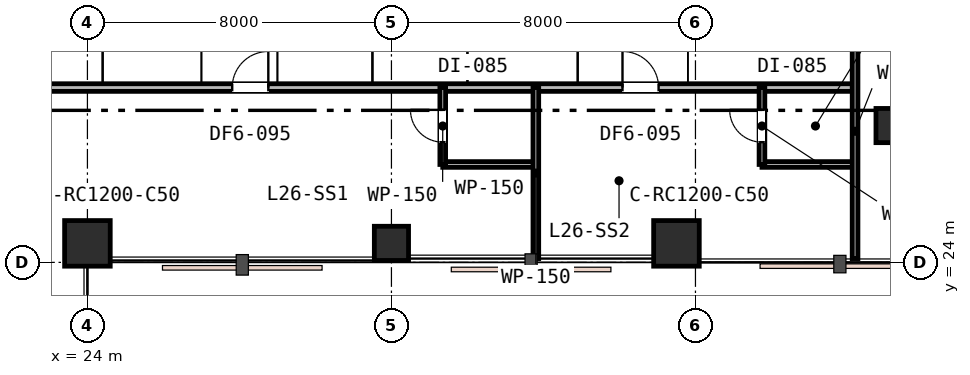
"""IFC4 building model, lengths in metres.
Left out: names, types, materials, properties, quantities, classifications, styles, units other than length and angle.
Written with IfcOpenShell. Run it as: python <this file> out.ifc"""

import sys

from ifc_helpers import new_model, si_unit, direction, frame, frame_2d, origin, origin_2d, place, context, subcontext, project, spatial, rectangle, extrude, element, fill, save


model = new_model("IFC4")
c1 = context("Model", 3, precision=1e-05, world=origin(), true_north=direction((0.0, 1.0)))
c2 = subcontext(c1, "Body", "Model", "MODEL_VIEW")
j1 = project(units=[si_unit("LENGTHUNIT", "METRE"), si_unit("PLANEANGLEUNIT", "RADIAN")], contexts=[c1])
p1 = place(None, origin())
s1 = spatial("IfcSite", under=j1, at=p1, CompositionType="ELEMENT")
p2 = place(p1, origin())
s2 = spatial("IfcBuilding", under=s1, at=p2, CompositionType="ELEMENT")
p3 = place(p2, frame((0.0, 0.0, 104.4)))
s3 = spatial("IfcBuildingStorey", under=s2, at=p3, CompositionType="ELEMENT", Elevation=104.4)
p4 = place(p3, frame((24.0, 24.5, 0.0), z_axis=(0.0, 0.0, 1.0), x_axis=(1.0, 0.0, 0.0)))
e1 = element("IfcColumn", 1, at=p4, inside=s3, PredefinedType="COLUMN", context=c2, shape_type="SweptSolid", body=[
    extrude(rectangle(XDim=1.2, YDim=1.2, at=origin_2d()), origin(), (0.0, 0.0, 1.0), 3.6),
])
p5 = place(p3, frame((32.0, 24.5, 0.0), z_axis=(0.0, 0.0, 1.0), x_axis=(1.0, 0.0, 0.0)))
e2 = element("IfcColumn", 2, at=p5, inside=s3, PredefinedType="COLUMN", context=c2, shape_type="SweptSolid", body=[
    extrude(rectangle(XDim=0.9, YDim=0.9, at=origin_2d()), origin(), (0.0, 0.0, 1.0), 3.6),
])
p6 = place(p3, frame((39.5, 24.5, 0.0), z_axis=(0.0, 0.0, 1.0), x_axis=(1.0, 0.0, 0.0)))
e3 = element("IfcColumn", 3, at=p6, inside=s3, PredefinedType="COLUMN", context=c2, shape_type="SweptSolid", body=[
    extrude(rectangle(XDim=1.2, YDim=1.2, at=origin_2d()), origin(), (0.0, 0.0, 1.0), 3.6),
])
p7 = place(p3, frame((45.2, 27.6, 0.0), z_axis=(0.0, 0.0, 1.0), x_axis=(1.0, 0.0, 0.0)))
e4 = element("IfcColumn", 4, at=p7, inside=s3, PredefinedType="COLUMN", context=c2, shape_type="SweptSolid", body=[
    extrude(rectangle(XDim=0.9, YDim=0.9, at=origin_2d()), origin(), (0.0, 0.0, 1.0), 3.6),
])
p8 = place(p3, frame((15.4, 28.6, 0.0), z_axis=(0.0, 0.0, 1.0), x_axis=(1.0, 0.0, 0.0)))
e5 = element("IfcWall", 5, at=p8, inside=s3, PredefinedType="PARTITIONING", context=c2, shape_type="SweptSolid", body=[
    extrude(rectangle(XDim=28.8, YDim=0.2, at=frame_2d((14.4, 0.0))), origin(), (0.0, 0.0, 1.0), 2.87),
])
p9 = place(p8, frame((12.41, 0.0, 0.0)))
e6 = element("IfcOpeningElement", 6, at=p9, cuts=e5, PredefinedType="OPENING", context=c2, shape_type="SweptSolid", body=[
    extrude(rectangle(XDim=0.95, YDim=2.15, at=frame_2d((0.475, 1.075))), frame((0.0, 0.11, 0.0), z_axis=(0.0, -1.0, 0.0), x_axis=(1.0, 0.0, 0.0)), (0.0, 0.0, 1.0), 0.22),
])
p10 = place(p8, frame((22.68, 0.0, 0.0)))
e7 = element("IfcOpeningElement", 7, at=p10, cuts=e5, PredefinedType="OPENING", context=c2, shape_type="SweptSolid", body=[
    extrude(rectangle(XDim=0.95, YDim=2.15, at=frame_2d((0.475, 1.075))), frame((0.0, 0.11, 0.0), z_axis=(0.0, -1.0, 0.0), x_axis=(1.0, 0.0, 0.0)), (0.0, 0.0, 1.0), 0.22),
])
p11 = place(p3, frame((33.35, 26.576, 0.0), z_axis=(0.0, 0.0, 1.0), x_axis=(1.0, 0.0, 0.0)))
e8 = element("IfcWall", 8, at=p11, inside=s3, PredefinedType="PARTITIONING", context=c2, shape_type="SweptSolid", body=[
    extrude(rectangle(XDim=2.45, YDim=0.15, at=frame_2d((1.225, 0.0))), origin(), (0.0, 0.0, 1.0), 3.01),
])
p12 = place(p3, frame((33.35, 26.576, 0.0), z_axis=(0.0, 0.0, 1.0), x_axis=(0.0, 1.0, 0.0)))
e9 = element("IfcWall", 9, at=p12, inside=s3, PredefinedType="PARTITIONING", context=c2, shape_type="SweptSolid", body=[
    extrude(rectangle(XDim=2.024, YDim=0.15, at=frame_2d((1.012, 0.0))), origin(), (0.0, 0.0, 1.0), 3.33),
])
p13 = place(p12, frame((0.587, 0.0, 0.0)))
e10 = element("IfcOpeningElement", 10, at=p13, cuts=e9, PredefinedType="OPENING", context=c2, shape_type="SweptSolid", body=[
    extrude(rectangle(XDim=0.85, YDim=2.15, at=frame_2d((0.425, 1.075))), frame((0.0, 0.085, 0.0), z_axis=(0.0, -1.0, 0.0), x_axis=(1.0, 0.0, 0.0)), (0.0, 0.0, 1.0), 0.17),
])
p14 = place(p3, frame((35.8, 28.6, 0.0), z_axis=(0.0, 0.0, 1.0), x_axis=(0.0, -1.0, 0.0)))
e11 = element("IfcWall", 11, at=p14, inside=s3, PredefinedType="PARTITIONING", context=c2, shape_type="SweptSolid", body=[
    extrude(rectangle(XDim=4.5, YDim=0.15, at=frame_2d((2.25, 0.0))), origin(), (0.0, 0.0, 1.0), 2.96),
])
p15 = place(p3, frame((41.75, 26.576, 0.0), z_axis=(0.0, 0.0, 1.0), x_axis=(1.0, 0.0, 0.0)))
e12 = element("IfcWall", 12, at=p15, inside=s3, PredefinedType="PARTITIONING", context=c2, shape_type="SweptSolid", body=[
    extrude(rectangle(XDim=2.45, YDim=0.15, at=frame_2d((1.225, 0.0))), origin(), (0.0, 0.0, 1.0), 3.33),
])
p16 = place(p3, frame((41.75, 26.576, 0.0), z_axis=(0.0, 0.0, 1.0), x_axis=(0.0, 1.0, 0.0)))
e13 = element("IfcWall", 13, at=p16, inside=s3, PredefinedType="PARTITIONING", context=c2, shape_type="SweptSolid", body=[
    extrude(rectangle(XDim=2.024, YDim=0.15, at=frame_2d((1.012, 0.0))), origin(), (0.0, 0.0, 1.0), 3.33),
])
p17 = place(p16, frame((0.587, 0.0, 0.0)))
e14 = element("IfcOpeningElement", 14, at=p17, cuts=e13, PredefinedType="OPENING", context=c2, shape_type="SweptSolid", body=[
    extrude(rectangle(XDim=0.85, YDim=2.15, at=frame_2d((0.425, 1.075))), frame((0.0, 0.085, 0.0), z_axis=(0.0, -1.0, 0.0), x_axis=(1.0, 0.0, 0.0)), (0.0, 0.0, 1.0), 0.17),
])
p18 = place(p3, frame((44.2, 30.8, 0.0), z_axis=(0.0, 0.0, 1.0), x_axis=(0.0, -1.0, 0.0)))
e15 = element("IfcWall", 15, at=p18, inside=s3, PredefinedType="PARTITIONING", context=c2, shape_type="SweptSolid", body=[
    extrude(rectangle(XDim=6.7, YDim=0.15, at=frame_2d((3.35, 0.0))), origin(), (0.0, 0.0, 1.0), 2.87),
])
p19 = place(p9, origin())
e16 = element("IfcDoor", 16, at=p19, inside=s3, OperationType="SINGLE_SWING_RIGHT", PredefinedType="DOOR", context=c2, shape_type="SweptSolid", body=[
    extrude(rectangle(XDim=0.95, YDim=2.15, at=frame_2d((0.475, 1.075))), frame((0.0, 0.025, 0.0), z_axis=(0.0, -1.0, 0.0), x_axis=(1.0, 0.0, 0.0)), (0.0, 0.0, 1.0), 0.05),
])
fill(e6, e16)
p20 = place(p13, origin())
e17 = element("IfcDoor", 17, at=p20, inside=s3, OperationType="SINGLE_SWING_RIGHT", PredefinedType="DOOR", context=c2, shape_type="SweptSolid", body=[
    extrude(rectangle(XDim=0.85, YDim=2.15, at=frame_2d((0.425, 1.075))), frame((0.0, 0.025, 0.0), z_axis=(0.0, -1.0, 0.0), x_axis=(1.0, 0.0, 0.0)), (0.0, 0.0, 1.0), 0.05),
])
fill(e10, e17)
p21 = place(p10, origin())
e18 = element("IfcDoor", 18, at=p21, inside=s3, OperationType="SINGLE_SWING_LEFT", PredefinedType="DOOR", context=c2, shape_type="SweptSolid", body=[
    extrude(rectangle(XDim=0.95, YDim=2.15, at=frame_2d((0.475, 1.075))), frame((0.0, 0.025, 0.0), z_axis=(0.0, -1.0, 0.0), x_axis=(1.0, 0.0, 0.0)), (0.0, 0.0, 1.0), 0.05),
])
fill(e7, e18)
p22 = place(p17, origin())
e19 = element("IfcDoor", 19, at=p22, inside=s3, OperationType="SINGLE_SWING_RIGHT", PredefinedType="DOOR", context=c2, shape_type="SweptSolid", body=[
    extrude(rectangle(XDim=0.85, YDim=2.15, at=frame_2d((0.425, 1.075))), frame((0.0, 0.025, 0.0), z_axis=(0.0, -1.0, 0.0), x_axis=(1.0, 0.0, 0.0)), (0.0, 0.0, 1.0), 0.05),
])
fill(e14, e19)
save(model, sys.argv[1])
